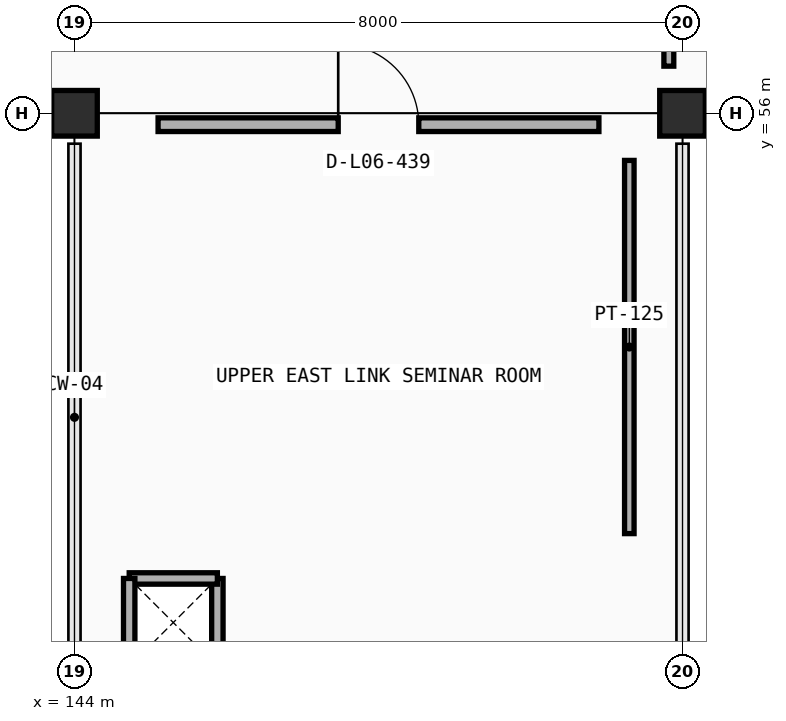
"""IFC4 building model, lengths in metres.
Left out: names, types, materials, properties, quantities, classifications, styles, units other than length and angle.
Written with IfcOpenShell. Run it as: python <this file> out.ifc"""

import sys

from ifc_helpers import new_model, si_unit, direction, frame, frame_2d, origin, origin_2d, place, context, subcontext, project, spatial, rectangle, extrude, element, fill, save


model = new_model("IFC4")
c1 = context("Model", 3, precision=1e-05, world=origin(), true_north=direction((0.0, 1.0)))
c2 = subcontext(c1, "Body", "Model", "MODEL_VIEW")
j1 = project(units=[si_unit("LENGTHUNIT", "METRE"), si_unit("PLANEANGLEUNIT", "RADIAN")], contexts=[c1])
p1 = place(None, origin())
s1 = spatial("IfcSite", under=j1, at=p1, CompositionType="ELEMENT")
p2 = place(p1, origin())
s2 = spatial("IfcBuilding", under=s1, at=p2, CompositionType="ELEMENT")
p3 = place(p2, frame((0.0, 0.0, 22.2)))
s3 = spatial("IfcBuildingStorey", under=s2, at=p3, CompositionType="ELEMENT", Elevation=22.2)
for number, where, z_axis, x_axis in (
    (1, (144.0, 56.0, 0.0), (0.0, 0.0, 1.0), (1.0, 0.0, 0.0)),
    (2, (152.0, 56.0, 0.0), (0.0, 0.0, 1.0), (1.0, 0.0, 0.0)),
):
    element("IfcColumn", number, at=place(p3, frame(where, z_axis=z_axis, x_axis=x_axis)), inside=s3, PredefinedType="COLUMN", context=c2, shape_type="SweptSolid", body=[
        extrude(rectangle(XDim=0.6, YDim=0.6, at=origin_2d()), origin(), (0.0, 0.0, 1.0), 4.2),
    ])
p4 = place(p3, frame((143.703, 56.0, 0.0), z_axis=(0.0, 0.0, 1.0), x_axis=(-1.0, 0.0, 0.0)))
e3 = element("IfcWall", 3, at=p4, inside=s3, PredefinedType="STANDARD", context=c2, shape_type="SweptSolid", body=[
    extrude(rectangle(XDim=7.406, YDim=0.24, at=frame_2d((3.703, 0.0))), origin(), (0.0, 0.0, 1.0), 3.335),
])
p5 = place(p4, frame((2.283, 0.0, 0.9)))
e4 = element("IfcOpeningElement", 4, at=p5, cuts=e3, PredefinedType="OPENING", context=c2, shape_type="SweptSolid", body=[
    extrude(rectangle(XDim=2.45, YDim=2.0, at=frame_2d((1.225, 1.0))), frame((0.0, 0.13, 0.0), z_axis=(0.0, -1.0, 0.0), x_axis=(1.0, 0.0, 0.0)), (0.0, 0.0, 1.0), 0.26),
])
p6 = place(p3, frame((159.703, 56.0, 0.0), z_axis=(0.0, 0.0, 1.0), x_axis=(-1.0, 0.0, 0.0)))
e5 = element("IfcWall", 5, at=p6, inside=s3, PredefinedType="STANDARD", context=c2, shape_type="SweptSolid", body=[
    extrude(rectangle(XDim=7.406, YDim=0.24, at=frame_2d((3.703, 0.0))), origin(), (0.0, 0.0, 1.0), 3.335),
])
p7 = place(p6, frame((2.283, 0.0, 0.9)))
e6 = element("IfcOpeningElement", 6, at=p7, cuts=e5, PredefinedType="OPENING", context=c2, shape_type="SweptSolid", body=[
    extrude(rectangle(XDim=2.85, YDim=2.0, at=frame_2d((1.425, 1.0))), frame((0.0, 0.13, 0.0), z_axis=(0.0, -1.0, 0.0), x_axis=(1.0, 0.0, 0.0)), (0.0, 0.0, 1.0), 0.26),
])
for number, where, z_axis, x_axis in (
    (7, (145.88, 48.72, 0.0), (0.0, 0.0, 1.0), (0.0, 1.0, 0.0)),
    (8, (145.88, 49.88, 0.0), (0.0, 0.0, 1.0), (-1.0, 0.0, 0.0)),
    (9, (144.72, 49.88, 0.0), (0.0, 0.0, 1.0), (0.0, -1.0, 0.0)),
):
    element("IfcWall", number, at=place(p3, frame(where, z_axis=z_axis, x_axis=x_axis)), inside=s3, PredefinedType="PARTITIONING", context=c2, shape_type="SweptSolid", body=[
        extrude(rectangle(XDim=1.16, YDim=0.15, at=frame_2d((0.58, 0.0))), origin(), (0.0, 0.0, 1.0), 3.9),
    ])
p8 = place(p3, frame((151.82, 56.62, 0.0), z_axis=(0.0, 0.0, 1.0), x_axis=(0.0, 1.0, 0.0)))
e10 = element("IfcWall", 10, at=p8, inside=s3, PredefinedType="MOVABLE", context=c2, shape_type="SweptSolid", body=[
    extrude(rectangle(XDim=6.81, YDim=0.13, at=frame_2d((3.405, 0.0))), origin(), (0.0, 0.0, 1.0), 3.3),
])
p9 = place(p3, frame((145.1, 55.85, 0.0), z_axis=(0.0, 0.0, 1.0), x_axis=(1.0, 0.0, 0.0)))
e11 = element("IfcWall", 11, at=p9, inside=s3, PredefinedType="PARTITIONING", context=c2, shape_type="SweptSolid", body=[
    extrude(rectangle(XDim=5.8, YDim=0.18, at=frame_2d((2.9, 0.0))), origin(), (0.0, 0.0, 1.0), 3.3),
])
p10 = place(p9, frame((2.37, 0.0, 0.0)))
e12 = element("IfcOpeningElement", 12, at=p10, cuts=e11, PredefinedType="OPENING", context=c2, shape_type="SweptSolid", body=[
    extrude(rectangle(XDim=1.06, YDim=2.1, at=frame_2d((0.53, 1.05))), frame((0.0, 0.1, 0.0), z_axis=(0.0, -1.0, 0.0), x_axis=(1.0, 0.0, 0.0)), (0.0, 0.0, 1.0), 0.2),
])
p11 = place(p3, frame((151.3, 50.47, 0.0), z_axis=(0.0, 0.0, 1.0), x_axis=(0.0, 1.0, 0.0)))
e13 = element("IfcWall", 13, at=p11, inside=s3, PredefinedType="PARTITIONING", context=c2, shape_type="SweptSolid", body=[
    extrude(rectangle(XDim=4.91, YDim=0.125, at=frame_2d((2.455, 0.0))), origin(), (0.0, 0.0, 1.0), 3.3),
])
p12 = place(p10, origin())
e14 = element("IfcDoor", 14, at=p12, inside=s3, OperationType="SINGLE_SWING_LEFT", PredefinedType="DOOR", context=c2, shape_type="SweptSolid", body=[
    extrude(rectangle(XDim=1.06, YDim=2.1, at=frame_2d((0.53, 1.05))), frame((0.0, 0.025, 0.0), z_axis=(0.0, -1.0, 0.0), x_axis=(1.0, 0.0, 0.0)), (0.0, 0.0, 1.0), 0.05),
])
fill(e12, e14)
save(model, sys.argv[1])
